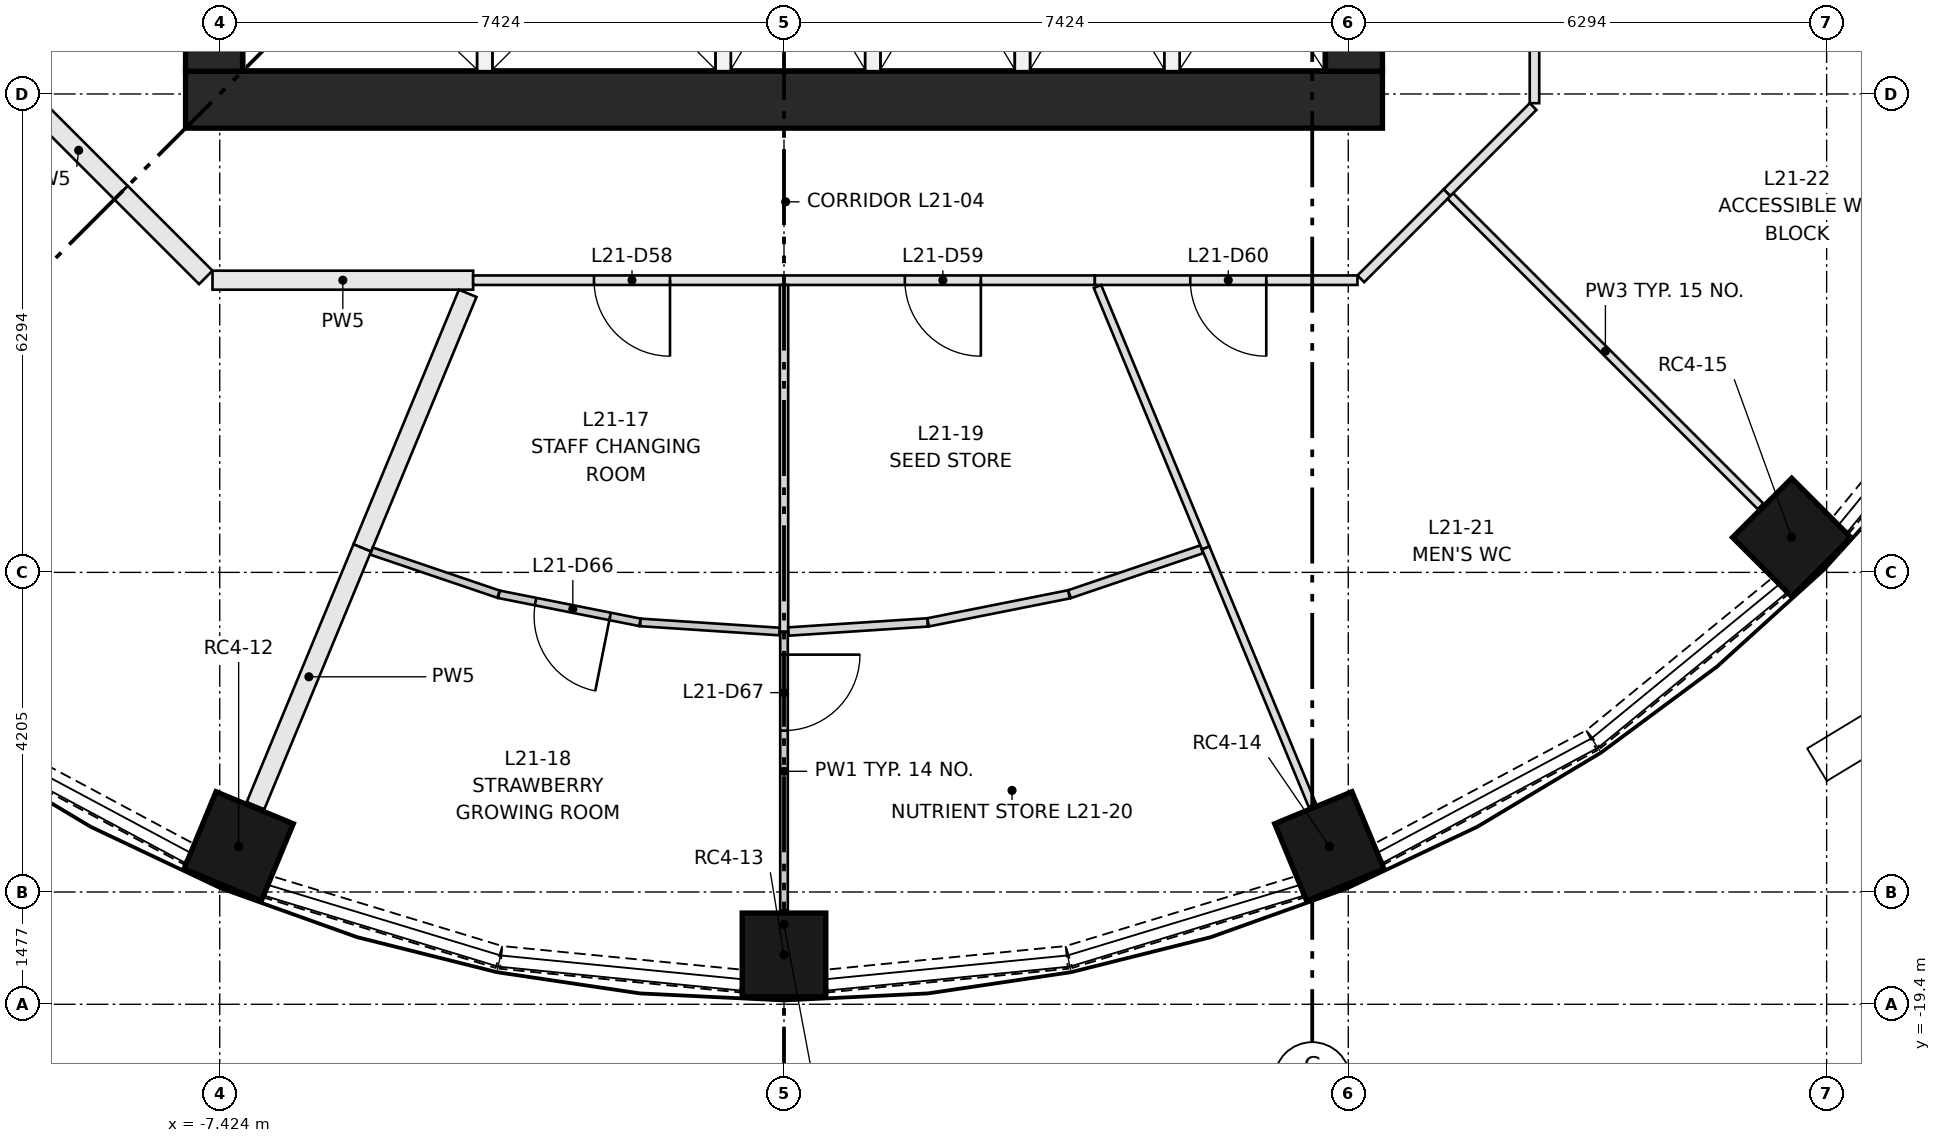
"""IFC4 building model, lengths in metres.
Left out: names, types, materials, properties, quantities, classifications, styles, units other than length and angle.
Written with IfcOpenShell. Run it as: python <this file> out.ifc"""

import sys

from ifc_helpers import new_model, si_unit, direction, frame, frame_2d, origin, origin_2d, place, context, subcontext, project, spatial, rectangle, extrude, element, fill, save


model = new_model("IFC4")
c1 = context("Model", 3, precision=1e-05, world=origin(), true_north=direction((0.0, 1.0)))
c2 = subcontext(c1, "Body", "Model", "MODEL_VIEW")
j1 = project(units=[si_unit("LENGTHUNIT", "METRE"), si_unit("PLANEANGLEUNIT", "RADIAN")], contexts=[c1])
p1 = place(None, origin())
s1 = spatial("IfcSite", under=j1, at=p1, CompositionType="ELEMENT")
p2 = place(p1, origin())
s2 = spatial("IfcBuilding", under=s1, at=p2, CompositionType="ELEMENT")
p3 = place(p2, frame((0.0, 0.0, 83.7)))
s3 = spatial("IfcBuildingStorey", under=s2, at=p3, CompositionType="ELEMENT", Elevation=83.7)
for number, where, z_axis, x_axis in (
    (1, (-7.175, -17.323, 0.0), (0.0, 0.0, 1.0), (-0.383, -0.924, 0.0)),
    (2, (0.0, -18.75, 0.0), (0.0, 0.0, 1.0), (0.0, -1.0, 0.0)),
    (3, (7.175, -17.323, 0.0), (0.0, 0.0, 1.0), (0.383, -0.924, 0.0)),
    (4, (13.258, -13.258, 0.0), (0.0, 0.0, 1.0), (0.707, -0.707, 0.0)),
):
    element("IfcColumn", number, at=place(p3, frame(where, z_axis=z_axis, x_axis=x_axis)), inside=s3, PredefinedType="COLUMN", context=c2, shape_type="SweptSolid", body=[
        extrude(rectangle(XDim=1.1, YDim=1.1, at=origin_2d()), origin(), (0.0, 0.0, 1.0), 3.65),
    ])
p4 = place(p3, frame((-7.874, -7.499, 0.0), z_axis=(0.0, 0.0, 1.0), x_axis=(1.0, 0.0, 0.0)))
e5 = element("IfcWall", 5, at=p4, inside=s3, PredefinedType="SHEAR", context=c2, shape_type="SweptSolid", body=[
    extrude(rectangle(XDim=15.748, YDim=0.75, at=frame_2d((7.874, 0.0))), origin(), (0.0, 0.0, 1.0), 3.65),
])
p5 = place(p3, frame((-7.499, -7.124, 0.0), z_axis=(0.0, 0.0, 1.0), x_axis=(0.0, 1.0, 0.0)))
e6 = element("IfcWall", 6, at=p5, inside=s3, PredefinedType="SHEAR", context=c2, shape_type="SweptSolid", body=[
    extrude(rectangle(XDim=14.248, YDim=0.75, at=frame_2d((7.124, 0.0))), origin(), (0.0, 0.0, 1.0), 3.65),
])
p6 = place(p5, frame((6.624, 0.0, 0.0)))
e7 = element("IfcOpeningElement", 7, at=p6, cuts=e6, PredefinedType="OPENING", context=c2, shape_type="SweptSolid", body=[
    extrude(rectangle(XDim=1.0, YDim=2.1, at=frame_2d((0.5, 1.05))), frame((0.0, 0.385, 0.0), z_axis=(0.0, -1.0, 0.0), x_axis=(1.0, 0.0, 0.0)), (0.0, 0.0, 1.0), 0.77),
])
p7 = place(p5, frame((3.5, 0.0, 0.0)))
e8 = element("IfcOpeningElement", 8, at=p7, cuts=e6, PredefinedType="OPENING", context=c2, shape_type="SweptSolid", body=[
    extrude(rectangle(XDim=1.8, YDim=2.1, at=frame_2d((0.9, 1.05))), frame((0.0, 0.385, 0.0), z_axis=(0.0, -1.0, 0.0), x_axis=(1.0, 0.0, 0.0)), (0.0, 0.0, 1.0), 0.77),
])
p8 = place(p5, frame((8.948, 0.0, 0.0)))
e9 = element("IfcOpeningElement", 9, at=p8, cuts=e6, PredefinedType="OPENING", context=c2, shape_type="SweptSolid", body=[
    extrude(rectangle(XDim=1.8, YDim=2.1, at=frame_2d((0.9, 1.05))), frame((0.0, 0.385, 0.0), z_axis=(0.0, -1.0, 0.0), x_axis=(1.0, 0.0, 0.0)), (0.0, 0.0, 1.0), 0.77),
])
p9 = place(p5, frame((12.124, 0.0, 0.0)))
e10 = element("IfcOpeningElement", 10, at=p9, cuts=e6, PredefinedType="OPENING", context=c2, shape_type="SweptSolid", body=[
    extrude(rectangle(XDim=1.0, YDim=2.1, at=frame_2d((0.5, 1.05))), frame((0.0, 0.385, 0.0), z_axis=(0.0, -1.0, 0.0), x_axis=(1.0, 0.0, 0.0)), (0.0, 0.0, 1.0), 0.77),
])
p10 = place(p3, frame((7.499, -7.124, 0.0), z_axis=(0.0, 0.0, 1.0), x_axis=(0.0, 1.0, 0.0)))
e11 = element("IfcWall", 11, at=p10, inside=s3, PredefinedType="SHEAR", context=c2, shape_type="SweptSolid", body=[
    extrude(rectangle(XDim=14.248, YDim=0.75, at=frame_2d((7.124, 0.0))), origin(), (0.0, 0.0, 1.0), 3.65),
])
p11 = place(p10, frame((6.624, 0.0, 0.0)))
e12 = element("IfcOpeningElement", 12, at=p11, cuts=e11, PredefinedType="OPENING", context=c2, shape_type="SweptSolid", body=[
    extrude(rectangle(XDim=1.0, YDim=2.1, at=frame_2d((0.5, 1.05))), frame((0.0, 0.385, 0.0), z_axis=(0.0, -1.0, 0.0), x_axis=(1.0, 0.0, 0.0)), (0.0, 0.0, 1.0), 0.77),
])
p12 = place(p10, frame((3.5, 0.0, 0.0)))
e13 = element("IfcOpeningElement", 13, at=p12, cuts=e11, PredefinedType="OPENING", context=c2, shape_type="SweptSolid", body=[
    extrude(rectangle(XDim=1.8, YDim=2.1, at=frame_2d((0.9, 1.05))), frame((0.0, 0.385, 0.0), z_axis=(0.0, -1.0, 0.0), x_axis=(1.0, 0.0, 0.0)), (0.0, 0.0, 1.0), 0.77),
])
p13 = place(p10, frame((8.948, 0.0, 0.0)))
e14 = element("IfcOpeningElement", 14, at=p13, cuts=e11, PredefinedType="OPENING", context=c2, shape_type="SweptSolid", body=[
    extrude(rectangle(XDim=1.8, YDim=2.1, at=frame_2d((0.9, 1.05))), frame((0.0, 0.385, 0.0), z_axis=(0.0, -1.0, 0.0), x_axis=(1.0, 0.0, 0.0)), (0.0, 0.0, 1.0), 0.77),
])
for number, where, z_axis, x_axis in (
    (15, (-3.937, -7.124, 0.0), (0.0, 0.0, 1.0), (0.0, 1.0, 0.0)),
    (16, (-0.8, -7.124, 0.0), (0.0, 0.0, 1.0), (0.0, 1.0, 0.0)),
    (17, (1.168, -7.124, 0.0), (0.0, 0.0, 1.0), (0.0, 1.0, 0.0)),
    (18, (3.137, -7.124, 0.0), (0.0, 0.0, 1.0), (0.0, 1.0, 0.0)),
    (19, (5.105, -7.124, 0.0), (0.0, 0.0, 1.0), (0.0, 1.0, 0.0)),
):
    element("IfcWall", number, at=place(p3, frame(where, z_axis=z_axis, x_axis=x_axis)), inside=s3, PredefinedType="PARTITIONING", context=c2, shape_type="SweptSolid", body=[
        extrude(rectangle(XDim=2.95, YDim=0.2, at=frame_2d((1.475, 0.0))), origin(), (0.0, 0.0, 1.0), 3.3),
    ])
p14 = place(p3, frame((-10.626, -15.929, 0.0), z_axis=(0.0, 0.0, 1.0), x_axis=(0.88188808669, -0.471458802606, 0.0)))
e20 = element("IfcWall", 20, at=p14, inside=s3, PredefinedType="SOLIDWALL", context=c2, shape_type="SweptSolid", body=[
    extrude(rectangle(XDim=3.172, YDim=0.3, at=frame_2d((1.586, 0.0))), origin(), (0.0, 0.0, 1.0), 0.9),
])
p15 = place(p3, frame((-6.787, -17.856, 0.0), z_axis=(0.0, 0.0, 1.0), x_axis=(0.956927923582, -0.290325591482, 0.0)))
e21 = element("IfcWall", 21, at=p15, inside=s3, PredefinedType="SOLIDWALL", context=c2, shape_type="SweptSolid", body=[
    extrude(rectangle(XDim=3.173, YDim=0.3, at=frame_2d((1.586, 0.0))), origin(), (0.0, 0.0, 1.0), 0.9),
])
for number, where, z_axis, x_axis in (
    (22, (-3.721, -18.783, 0.0), (0.0, 0.0, 1.0), (0.995, -0.098, 0.0)),
    (23, (0.564, -19.094, 0.0), (0.0, 0.0, 1.0), (0.995, 0.098, 0.0)),
):
    element("IfcWall", number, at=place(p3, frame(where, z_axis=z_axis, x_axis=x_axis)), inside=s3, PredefinedType="SOLIDWALL", context=c2, shape_type="SweptSolid", body=[
        extrude(rectangle(XDim=3.173, YDim=0.3, at=frame_2d((1.586, 0.0))), origin(), (0.0, 0.0, 1.0), 0.9),
    ])
p16 = place(p3, frame((3.75, -18.778, 0.0), z_axis=(0.0, 0.0, 1.0), x_axis=(0.956927923582, 0.290325591482, 0.0)))
e24 = element("IfcWall", 24, at=p16, inside=s3, PredefinedType="SOLIDWALL", context=c2, shape_type="SweptSolid", body=[
    extrude(rectangle(XDim=3.173, YDim=0.3, at=frame_2d((1.586, 0.0))), origin(), (0.0, 0.0, 1.0), 0.9),
])
p17 = place(p3, frame((7.828, -17.425, 0.0), z_axis=(0.0, 0.0, 1.0), x_axis=(0.88188808669, 0.471458802606, 0.0)))
e25 = element("IfcWall", 25, at=p17, inside=s3, PredefinedType="SOLIDWALL", context=c2, shape_type="SweptSolid", body=[
    extrude(rectangle(XDim=3.172, YDim=0.3, at=frame_2d((1.586, 0.0))), origin(), (0.0, 0.0, 1.0), 0.9),
])
for number, where, z_axis, x_axis in (
    (26, (10.651, -15.913, 0.0), (0.0, 0.0, 1.0), (0.773, 0.634, 0.0)),
    (27, (13.9, -13.104, 0.0), (0.0, 0.0, 1.0), (0.634, 0.773, 0.0)),
):
    element("IfcWall", number, at=place(p3, frame(where, z_axis=z_axis, x_axis=x_axis)), inside=s3, PredefinedType="SOLIDWALL", context=c2, shape_type="SweptSolid", body=[
        extrude(rectangle(XDim=3.173, YDim=0.3, at=frame_2d((1.586, 0.0))), origin(), (0.0, 0.0, 1.0), 0.9),
    ])
p18 = place(p3, frame((9.856, -7.589, 0.0), z_axis=(0.0, 0.0, 1.0), x_axis=(-0.70718294931, -0.707030604857, 0.0)))
e28 = element("IfcWall", 28, at=p18, inside=s3, PredefinedType="PARTITIONING", context=c2, shape_type="SweptSolid", body=[
    extrude(rectangle(XDim=1.603, YDim=0.125, at=frame_2d((0.801, 0.0))), origin(), (0.0, 0.0, 1.0), 3.3),
])
p19 = place(p3, frame((9.874, -4.09, 0.0), z_axis=(0.0, 0.0, 1.0), x_axis=(0.0, -1.0, 0.0)))
e29 = element("IfcWall", 29, at=p19, inside=s3, PredefinedType="PARTITIONING", context=c2, shape_type="SweptSolid", body=[
    extrude(rectangle(XDim=3.455, YDim=0.125, at=frame_2d((1.728, 0.0))), origin(), (0.0, 0.0, 1.0), 3.3),
])
p20 = place(p19, frame((1.2, 0.0, 0.0)))
e30 = element("IfcOpeningElement", 30, at=p20, cuts=e29, PredefinedType="OPENING", context=c2, shape_type="SweptSolid", body=[
    extrude(rectangle(XDim=1.0, YDim=2.1, at=frame_2d((0.5, 1.05))), frame((0.0, 0.073, 0.0), z_axis=(0.0, -1.0, 0.0), x_axis=(1.0, 0.0, 0.0)), (0.0, 0.0, 1.0), 0.145),
])
for number, where, z_axis, x_axis in (
    (31, (-8.722, -8.722, 0.0), (0.0, 0.0, 1.0), (-0.707, 0.707, 0.0)),
    (32, (-7.608, -9.837, 0.0), (0.0, 0.0, 1.0), (-0.707, 0.707, 0.0)),
):
    element("IfcWall", number, at=place(p3, frame(where, z_axis=z_axis, x_axis=x_axis)), inside=s3, PredefinedType="PARTITIONING", context=c2, shape_type="SweptSolid", body=[
        extrude(rectangle(XDim=1.577, YDim=0.25, at=frame_2d((0.788, 0.0))), origin(), (0.0, 0.0, 1.0), 3.3),
    ])
p21 = place(p3, frame((-4.09, -9.874, 0.0), z_axis=(0.0, 0.0, 1.0), x_axis=(-1.0, 0.0, 0.0)))
e33 = element("IfcWall", 33, at=p21, inside=s3, PredefinedType="PARTITIONING", context=c2, shape_type="SweptSolid", body=[
    extrude(rectangle(XDim=3.429, YDim=0.25, at=frame_2d((1.715, 0.0))), origin(), (0.0, 0.0, 1.0), 3.3),
])
p22 = place(p3, frame((0.0, -9.874, 0.0), z_axis=(0.0, 0.0, 1.0), x_axis=(-1.0, 0.0, 0.0)))
e34 = element("IfcWall", 34, at=p22, inside=s3, PredefinedType="PARTITIONING", context=c2, shape_type="SweptSolid", body=[
    extrude(rectangle(XDim=4.09, YDim=0.125, at=frame_2d((2.045, 0.0))), origin(), (0.0, 0.0, 1.0), 3.3),
])
p23 = place(p22, frame((1.5, 0.0, 0.0)))
e35 = element("IfcOpeningElement", 35, at=p23, cuts=e34, PredefinedType="OPENING", context=c2, shape_type="SweptSolid", body=[
    extrude(rectangle(XDim=1.0, YDim=2.1, at=frame_2d((0.5, 1.05))), frame((0.0, 0.073, 0.0), z_axis=(0.0, -1.0, 0.0), x_axis=(1.0, 0.0, 0.0)), (0.0, 0.0, 1.0), 0.145),
])
p24 = place(p3, frame((4.09, -9.874, 0.0), z_axis=(0.0, 0.0, 1.0), x_axis=(-1.0, 0.0, 0.0)))
e36 = element("IfcWall", 36, at=p24, inside=s3, PredefinedType="PARTITIONING", context=c2, shape_type="SweptSolid", body=[
    extrude(rectangle(XDim=4.09, YDim=0.125, at=frame_2d((2.045, 0.0))), origin(), (0.0, 0.0, 1.0), 3.3),
])
p25 = place(p24, frame((1.5, 0.0, 0.0)))
e37 = element("IfcOpeningElement", 37, at=p25, cuts=e36, PredefinedType="OPENING", context=c2, shape_type="SweptSolid", body=[
    extrude(rectangle(XDim=1.0, YDim=2.1, at=frame_2d((0.5, 1.05))), frame((0.0, 0.073, 0.0), z_axis=(0.0, -1.0, 0.0), x_axis=(1.0, 0.0, 0.0)), (0.0, 0.0, 1.0), 0.145),
])
p26 = place(p3, frame((7.545, -9.874, 0.0), z_axis=(0.0, 0.0, 1.0), x_axis=(-1.0, 0.0, 0.0)))
e38 = element("IfcWall", 38, at=p26, inside=s3, PredefinedType="PARTITIONING", context=c2, shape_type="SweptSolid", body=[
    extrude(rectangle(XDim=3.455, YDim=0.125, at=frame_2d((1.728, 0.0))), origin(), (0.0, 0.0, 1.0), 3.3),
])
p27 = place(p26, frame((1.2, 0.0, 0.0)))
e39 = element("IfcOpeningElement", 39, at=p27, cuts=e38, PredefinedType="OPENING", context=c2, shape_type="SweptSolid", body=[
    extrude(rectangle(XDim=1.0, YDim=2.1, at=frame_2d((0.5, 1.05))), frame((0.0, 0.073, 0.0), z_axis=(0.0, -1.0, 0.0), x_axis=(1.0, 0.0, 0.0)), (0.0, 0.0, 1.0), 0.145),
])
p28 = place(p3, frame((8.722, -8.722, 0.0), z_axis=(0.0, 0.0, 1.0), x_axis=(-0.707030604857, -0.70718294931, 0.0)))
e40 = element("IfcWall", 40, at=p28, inside=s3, PredefinedType="PARTITIONING", context=c2, shape_type="SweptSolid", body=[
    extrude(rectangle(XDim=1.603, YDim=0.125, at=frame_2d((0.801, 0.0))), origin(), (0.0, 0.0, 1.0), 3.3),
])
p29 = place(p3, frame((-4.162, -10.047, 0.0), z_axis=(0.0, 0.0, 1.0), x_axis=(-0.382649180879, -0.923893719197, 0.0)))
e41 = element("IfcWall", 41, at=p29, inside=s3, PredefinedType="PARTITIONING", context=c2, shape_type="SweptSolid", body=[
    extrude(rectangle(XDim=3.625, YDim=0.25, at=frame_2d((1.812, 0.0))), origin(), (0.0, 0.0, 1.0), 3.3),
])
p30 = place(p3, frame((-5.549, -13.396, 0.0), z_axis=(0.0, 0.0, 1.0), x_axis=(-0.382706260748, -0.923870076355, 0.0)))
e42 = element("IfcWall", 42, at=p30, inside=s3, PredefinedType="PARTITIONING", context=c2, shape_type="SweptSolid", body=[
    extrude(rectangle(XDim=3.67, YDim=0.25, at=frame_2d((1.835, 0.0))), origin(), (0.0, 0.0, 1.0), 3.3),
])
p31 = place(p3, frame((-3.756, -14.005, 0.0), z_axis=(0.0, 0.0, 1.0), x_axis=(-0.946911786272, 0.321493497633, 0.0)))
e43 = element("IfcWall", 43, at=p31, inside=s3, PredefinedType="PARTITIONING", context=c2, shape_type="SweptSolid", body=[
    extrude(rectangle(XDim=1.765, YDim=0.1, at=frame_2d((0.882, 0.0))), origin(), (0.0, 0.0, 1.0), 3.3),
])
p32 = place(p3, frame((-1.896, -14.375, 0.0), z_axis=(0.0, 0.0, 1.0), x_axis=(-0.980773924018, 0.19514740574, 0.0)))
e44 = element("IfcWall", 44, at=p32, inside=s3, PredefinedType="PARTITIONING", context=c2, shape_type="SweptSolid", body=[
    extrude(rectangle(XDim=1.89, YDim=0.1, at=frame_2d((0.945, 0.0))), origin(), (0.0, 0.0, 1.0), 3.3),
])
p33 = place(p32, frame((0.4, 0.0, 0.0)))
e45 = element("IfcOpeningElement", 45, at=p33, cuts=e44, PredefinedType="OPENING", context=c2, shape_type="SweptSolid", body=[
    extrude(rectangle(XDim=1.0, YDim=2.1, at=frame_2d((0.5, 1.05))), frame((0.0, 0.06, 0.0), z_axis=(0.0, -1.0, 0.0), x_axis=(1.0, 0.0, 0.0)), (0.0, 0.0, 1.0), 0.12),
])
p34 = place(p3, frame((-0.058, -14.496, 0.0), z_axis=(0.0, 0.0, 1.0), x_axis=(-0.99786392157, 0.065326824732, 0.0)))
e46 = element("IfcWall", 46, at=p34, inside=s3, PredefinedType="PARTITIONING", context=c2, shape_type="SweptSolid", body=[
    extrude(rectangle(XDim=1.835, YDim=0.1, at=frame_2d((0.917, 0.0))), origin(), (0.0, 0.0, 1.0), 3.3),
])
p35 = place(p3, frame((0.0, -9.937, 0.0), z_axis=(0.0, 0.0, 1.0), x_axis=(0.0, -1.0, 0.0)))
e47 = element("IfcWall", 47, at=p35, inside=s3, PredefinedType="PARTITIONING", context=c2, shape_type="SweptSolid", body=[
    extrude(rectangle(XDim=4.563, YDim=0.11, at=frame_2d((2.282, 0.0))), origin(), (0.0, 0.0, 1.0), 3.3),
])
p36 = place(p3, frame((0.0, -14.5, 0.0), z_axis=(0.0, 0.0, 1.0), x_axis=(0.0, -1.0, 0.0)))
e48 = element("IfcWall", 48, at=p36, inside=s3, PredefinedType="PARTITIONING", context=c2, shape_type="SweptSolid", body=[
    extrude(rectangle(XDim=3.67, YDim=0.1, at=frame_2d((1.835, 0.0))), origin(), (0.0, 0.0, 1.0), 3.3),
])
p37 = place(p36, frame((0.3, 0.0, 0.0)))
e49 = element("IfcOpeningElement", 49, at=p37, cuts=e48, PredefinedType="OPENING", context=c2, shape_type="SweptSolid", body=[
    extrude(rectangle(XDim=1.0, YDim=2.1, at=frame_2d((0.5, 1.05))), frame((0.0, 0.06, 0.0), z_axis=(0.0, -1.0, 0.0), x_axis=(1.0, 0.0, 0.0)), (0.0, 0.0, 1.0), 0.12),
])
p38 = place(p3, frame((1.889, -14.376, 0.0), z_axis=(0.0, 0.0, 1.0), x_axis=(-0.99786221716, -0.065352854292, 0.0)))
e50 = element("IfcWall", 50, at=p38, inside=s3, PredefinedType="PARTITIONING", context=c2, shape_type="SweptSolid", body=[
    extrude(rectangle(XDim=1.834, YDim=0.11, at=frame_2d((0.917, 0.0))), origin(), (0.0, 0.0, 1.0), 3.3),
])
p39 = place(p3, frame((3.75, -14.007, 0.0), z_axis=(0.0, 0.0, 1.0), x_axis=(-0.980788807459, -0.195072589471, 0.0)))
e51 = element("IfcWall", 51, at=p39, inside=s3, PredefinedType="PARTITIONING", context=c2, shape_type="SweptSolid", body=[
    extrude(rectangle(XDim=1.89, YDim=0.11, at=frame_2d((0.945, 0.0))), origin(), (0.0, 0.0, 1.0), 3.3),
])
p40 = place(p3, frame((5.496, -13.414, 0.0), z_axis=(0.0, 0.0, 1.0), x_axis=(-0.946941139485, -0.321407029095, 0.0)))
e52 = element("IfcWall", 52, at=p40, inside=s3, PredefinedType="PARTITIONING", context=c2, shape_type="SweptSolid", body=[
    extrude(rectangle(XDim=1.837, YDim=0.11, at=frame_2d((0.918, 0.0))), origin(), (0.0, 0.0, 1.0), 3.3),
])
p41 = place(p3, frame((4.124, -9.957, 0.0), z_axis=(0.0, 0.0, 1.0), x_axis=(0.382691554869, -0.923876168018, 0.0)))
e53 = element("IfcWall", 53, at=p41, inside=s3, PredefinedType="PARTITIONING", context=c2, shape_type="SweptSolid", body=[
    extrude(rectangle(XDim=3.723, YDim=0.105, at=frame_2d((1.862, 0.0))), origin(), (0.0, 0.0, 1.0), 3.3),
])
p42 = place(p3, frame((5.549, -13.396, 0.0), z_axis=(0.0, 0.0, 1.0), x_axis=(0.382706260748, -0.923870076355, 0.0)))
e54 = element("IfcWall", 54, at=p42, inside=s3, PredefinedType="PARTITIONING", context=c2, shape_type="SweptSolid", body=[
    extrude(rectangle(XDim=3.67, YDim=0.105, at=frame_2d((1.835, 0.0))), origin(), (0.0, 0.0, 1.0), 3.3),
])
p43 = place(p3, frame((8.767, -8.767, 0.0), z_axis=(0.0, 0.0, 1.0), x_axis=(0.707106781187, -0.707106781187, 0.0)))
e55 = element("IfcWall", 55, at=p43, inside=s3, PredefinedType="PARTITIONING", context=c2, shape_type="SweptSolid", body=[
    extrude(rectangle(XDim=5.772, YDim=0.105, at=frame_2d((2.886, 0.0))), origin(), (0.0, 0.0, 1.0), 3.3),
])
p44 = place(p3, frame((14.043, -5.817, 0.0), z_axis=(0.0, 0.0, 1.0), x_axis=(0.923889594764, -0.382659139036, 0.0)))
e56 = element("IfcWall", 56, at=p44, inside=s3, PredefinedType="PARTITIONING", context=c2, shape_type="SweptSolid", body=[
    extrude(rectangle(XDim=2.97, YDim=0.105, at=frame_2d((1.485, 0.0))), origin(), (0.0, 0.0, 1.0), 3.3),
])
p45 = place(p23, origin())
e57 = element("IfcDoor", 57, at=p45, inside=s3, OperationType="SINGLE_SWING_LEFT", PredefinedType="DOOR", context=c2, shape_type="SweptSolid", body=[
    extrude(rectangle(XDim=1.0, YDim=2.1, at=frame_2d((0.5, 1.05))), frame((0.0, 0.025, 0.0), z_axis=(0.0, -1.0, 0.0), x_axis=(1.0, 0.0, 0.0)), (0.0, 0.0, 1.0), 0.05),
])
fill(e35, e57)
p46 = place(p25, origin())
e58 = element("IfcDoor", 58, at=p46, inside=s3, OperationType="SINGLE_SWING_LEFT", PredefinedType="DOOR", context=c2, shape_type="SweptSolid", body=[
    extrude(rectangle(XDim=1.0, YDim=2.1, at=frame_2d((0.5, 1.05))), frame((0.0, 0.025, 0.0), z_axis=(0.0, -1.0, 0.0), x_axis=(1.0, 0.0, 0.0)), (0.0, 0.0, 1.0), 0.05),
])
fill(e37, e58)
p47 = place(p27, origin())
e59 = element("IfcDoor", 59, at=p47, inside=s3, OperationType="SINGLE_SWING_LEFT", PredefinedType="DOOR", context=c2, shape_type="SweptSolid", body=[
    extrude(rectangle(XDim=1.0, YDim=2.1, at=frame_2d((0.5, 1.05))), frame((0.0, 0.025, 0.0), z_axis=(0.0, -1.0, 0.0), x_axis=(1.0, 0.0, 0.0)), (0.0, 0.0, 1.0), 0.05),
])
fill(e39, e59)
p48 = place(p33, origin())
e60 = element("IfcDoor", 60, at=p48, inside=s3, OperationType="SINGLE_SWING_LEFT", PredefinedType="DOOR", context=c2, shape_type="SweptSolid", body=[
    extrude(rectangle(XDim=1.0, YDim=2.1, at=frame_2d((0.5, 1.05))), frame((0.0, 0.025, 0.0), z_axis=(0.0, -1.0, 0.0), x_axis=(1.0, 0.0, 0.0)), (0.0, 0.0, 1.0), 0.05),
])
fill(e45, e60)
p49 = place(p37, origin())
e61 = element("IfcDoor", 61, at=p49, inside=s3, OperationType="SINGLE_SWING_LEFT", PredefinedType="DOOR", context=c2, shape_type="SweptSolid", body=[
    extrude(rectangle(XDim=1.0, YDim=2.1, at=frame_2d((0.5, 1.05))), frame((0.0, 0.025, 0.0), z_axis=(0.0, -1.0, 0.0), x_axis=(1.0, 0.0, 0.0)), (0.0, 0.0, 1.0), 0.05),
])
fill(e49, e61)
save(model, sys.argv[1])
